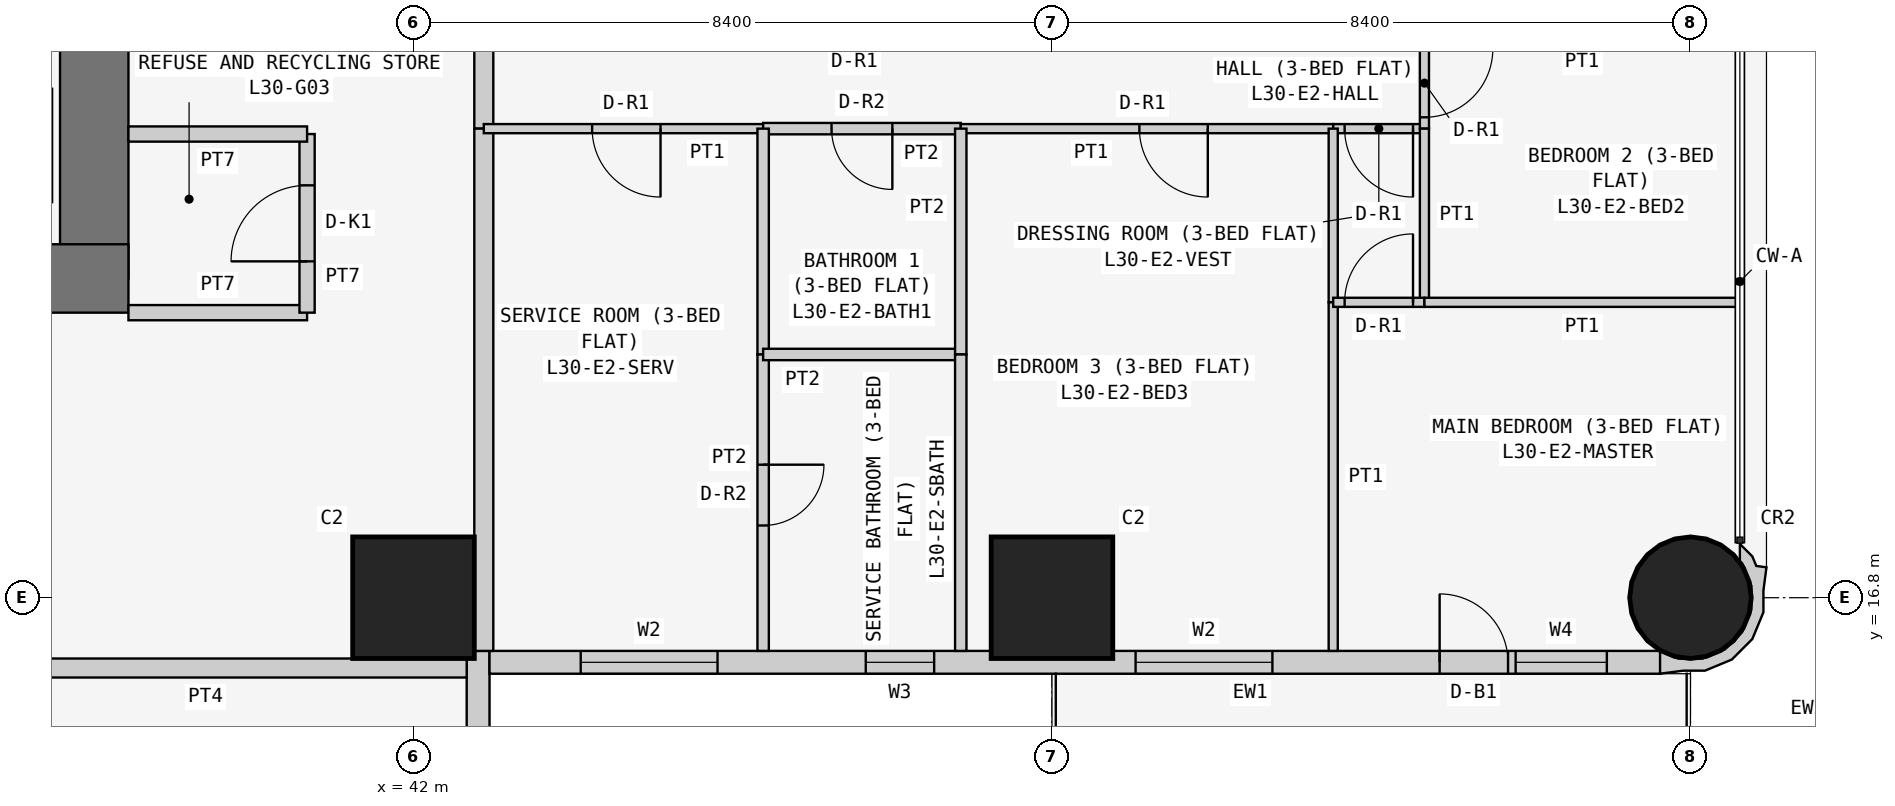
"""IFC4 building model, lengths in metres.
Left out: names, types, materials, properties, quantities, classifications, styles, units other than length and angle.
Written with IfcOpenShell. Run it as: python <this file> out.ifc"""

import sys

from ifc_helpers import new_model, si_unit, direction, frame, frame_2d, origin, origin_2d, place, context, subcontext, project, spatial, polyline, rectangle, circle, outline, extrude, element, fill, save


model = new_model("IFC4")
c1 = context("Model", 3, precision=1e-05, world=origin(), true_north=direction((0.0, 1.0)))
c2 = subcontext(c1, "Body", "Model", "MODEL_VIEW")
j1 = project(units=[si_unit("LENGTHUNIT", "METRE"), si_unit("PLANEANGLEUNIT", "RADIAN")], contexts=[c1])
p1 = place(None, origin())
s1 = spatial("IfcSite", under=j1, at=p1, CompositionType="ELEMENT")
p2 = place(p1, origin())
s2 = spatial("IfcBuilding", under=s1, at=p2, CompositionType="ELEMENT")
p3 = place(p2, frame((0.0, 0.0, 119.7)))
s3 = spatial("IfcBuildingStorey", under=s2, at=p3, CompositionType="ELEMENT", Elevation=119.7)
for number, where, z_axis, x_axis in (
    (1, (42.0, 16.8, 0.0), (0.0, 0.0, 1.0), (1.0, 0.0, 0.0)),
    (2, (50.4, 16.8, 0.0), (0.0, 0.0, 1.0), (1.0, 0.0, 0.0)),
):
    element("IfcColumn", number, at=place(p3, frame(where, z_axis=z_axis, x_axis=x_axis)), inside=s3, PredefinedType="COLUMN", context=c2, shape_type="SweptSolid", body=[
        extrude(rectangle(XDim=1.6, YDim=1.6, at=origin_2d()), origin(), (0.0, 0.0, 1.0), 3.6),
    ])
p4 = place(p3, frame((58.8, 16.8, 0.0), z_axis=(0.0, 0.0, 1.0), x_axis=(1.0, 0.0, 0.0)))
e3 = element("IfcColumn", 3, at=p4, inside=s3, PredefinedType="COLUMN", context=c2, shape_type="SweptSolid", body=[
    extrude(circle(Radius=0.8, at=origin_2d()), origin(), (0.0, 0.0, 1.0), 3.6),
])
p5 = place(p3, frame((21.0, 21.0, 0.0), z_axis=(0.0, 0.0, 1.0), x_axis=(1.0, 0.0, 0.0)))
e4 = element("IfcWall", 4, at=p5, inside=s3, PredefinedType="SHEAR", context=c2, shape_type="SweptSolid", body=[
    extrude(rectangle(XDim=17.25, YDim=0.9, at=frame_2d((8.625, 0.0))), origin(), (0.0, 0.0, 1.0), 3.6),
])
p6 = place(p3, frame((37.8, 21.0, 0.0), z_axis=(0.0, 0.0, 1.0), x_axis=(0.0, 1.0, 0.0)))
e5 = element("IfcWall", 5, at=p6, inside=s3, PredefinedType="SHEAR", context=c2, shape_type="SweptSolid", body=[
    extrude(rectangle(XDim=17.25, YDim=0.9, at=frame_2d((8.625, 0.0))), origin(), (0.0, 0.0, 1.0), 3.6),
])
p7 = place(p6, frame((5.2, 0.0, 0.0)))
e6 = element("IfcOpeningElement", 6, at=p7, cuts=e5, PredefinedType="OPENING", context=c2, shape_type="SweptSolid", body=[
    extrude(rectangle(XDim=1.2, YDim=2.1, at=frame_2d((0.6, 1.05))), frame((0.0, 0.46, 0.0), z_axis=(0.0, -1.0, 0.0), x_axis=(1.0, 0.0, 0.0)), (0.0, 0.0, 1.0), 0.92),
])
p8 = place(p3, frame((42.85, 8.8, 0.0), z_axis=(0.0, 0.0, 1.0), x_axis=(0.0, 1.0, 0.0)))
e7 = element("IfcWall", 7, at=p8, inside=s3, PredefinedType="SOLIDWALL", context=c2, shape_type="SweptSolid", body=[
    extrude(rectangle(XDim=7.3, YDim=0.3, at=frame_2d((3.65, 0.0))), origin(), (0.0, 0.0, 1.0), 3.45),
])
p9 = place(p8, frame((3.1, 0.0, 0.9)))
e8 = element("IfcOpeningElement", 8, at=p9, cuts=e7, PredefinedType="OPENING", context=c2, shape_type="SweptSolid", body=[
    extrude(rectangle(XDim=2.4, YDim=1.5, at=frame_2d((1.2, 0.75))), frame((0.0, 0.16, 0.0), z_axis=(0.0, -1.0, 0.0), x_axis=(1.0, 0.0, 0.0)), (0.0, 0.0, 1.0), 0.32),
])
p10 = place(p8, frame((0.75, 0.0, 0.9)))
e9 = element("IfcOpeningElement", 9, at=p10, cuts=e7, PredefinedType="OPENING", context=c2, shape_type="SweptSolid", body=[
    extrude(rectangle(XDim=1.2, YDim=1.5, at=frame_2d((0.6, 0.75))), frame((0.0, 0.16, 0.0), z_axis=(0.0, -1.0, 0.0), x_axis=(1.0, 0.0, 0.0)), (0.0, 0.0, 1.0), 0.32),
])
p11 = place(p3, frame((43.0, 15.95, 0.0), z_axis=(0.0, 0.0, 1.0), x_axis=(1.0, 0.0, 0.0)))
e10 = element("IfcWall", 10, at=p11, inside=s3, PredefinedType="SOLIDWALL", context=c2, shape_type="SweptSolid", body=[
    extrude(rectangle(XDim=15.4, YDim=0.3, at=frame_2d((7.7, 0.0))), origin(), (0.0, 0.0, 1.0), 3.45),
])
p12 = place(p11, frame((1.2, 0.0, 0.9)))
e11 = element("IfcOpeningElement", 11, at=p12, cuts=e10, PredefinedType="OPENING", context=c2, shape_type="SweptSolid", body=[
    extrude(rectangle(XDim=1.8, YDim=1.5, at=frame_2d((0.9, 0.75))), frame((0.0, 0.16, 0.0), z_axis=(0.0, -1.0, 0.0), x_axis=(1.0, 0.0, 0.0)), (0.0, 0.0, 1.0), 0.32),
])
p13 = place(p11, frame((4.95, 0.0, 1.5)))
e12 = element("IfcOpeningElement", 12, at=p13, cuts=e10, PredefinedType="OPENING", context=c2, shape_type="SweptSolid", body=[
    extrude(rectangle(XDim=0.9, YDim=0.7, at=frame_2d((0.45, 0.35))), frame((0.0, 0.16, 0.0), z_axis=(0.0, -1.0, 0.0), x_axis=(1.0, 0.0, 0.0)), (0.0, 0.0, 1.0), 0.32),
])
p14 = place(p11, frame((8.5, 0.0, 0.9)))
e13 = element("IfcOpeningElement", 13, at=p14, cuts=e10, PredefinedType="OPENING", context=c2, shape_type="SweptSolid", body=[
    extrude(rectangle(XDim=1.8, YDim=1.5, at=frame_2d((0.9, 0.75))), frame((0.0, 0.16, 0.0), z_axis=(0.0, -1.0, 0.0), x_axis=(1.0, 0.0, 0.0)), (0.0, 0.0, 1.0), 0.32),
])
p15 = place(p11, frame((12.5, 0.0, 0.0)))
e14 = element("IfcOpeningElement", 14, at=p15, cuts=e10, PredefinedType="OPENING", context=c2, shape_type="SweptSolid", body=[
    extrude(rectangle(XDim=0.9, YDim=2.4, at=frame_2d((0.45, 1.2))), frame((0.0, 0.16, 0.0), z_axis=(0.0, -1.0, 0.0), x_axis=(1.0, 0.0, 0.0)), (0.0, 0.0, 1.0), 0.32),
])
p16 = place(p11, frame((13.5, 0.0, 0.9)))
e15 = element("IfcOpeningElement", 15, at=p16, cuts=e10, PredefinedType="OPENING", context=c2, shape_type="SweptSolid", body=[
    extrude(rectangle(XDim=1.2, YDim=1.5, at=frame_2d((0.6, 0.75))), frame((0.0, 0.16, 0.0), z_axis=(0.0, -1.0, 0.0), x_axis=(1.0, 0.0, 0.0)), (0.0, 0.0, 1.0), 0.32),
])
p17 = place(p3, frame((58.473, 15.983, 0.0), z_axis=(0.0, 0.0, 1.0), x_axis=(0.93923434088, -0.343276641956, 0.0)))
e16 = element("IfcWall", 16, at=p17, inside=s3, PredefinedType="SOLIDWALL", context=c2, shape_type="SweptSolid", body=[
    extrude(outline(polyline([(0.828, 1.599), (0.697, 1.569), (0.604, 1.67), (0.394, 1.767), (0.471, 1.556), (0.508, 1.539), (0.724, 1.304), (0.834, 1.005), (0.82, 0.686), (0.686, 0.397), (0.451, 0.182), (0.152, 0.073), (-0.116, 0.084), (-0.127, 0.078), (-0.146, 0.071), (-0.006, -0.197), (0.266, -0.055), (0.535, 0.044), (0.817, 0.302), (0.978, 0.648), (0.994, 1.03), (0.895, 1.3), (0.828, 1.599)])), origin(), (0.0, 0.0, 1.0), 3.45),
])
p18 = place(p3, frame((38.25, 20.55, 0.0), z_axis=(0.0, 0.0, 1.0), x_axis=(1.0, 0.0, 0.0)))
e17 = element("IfcWall", 17, at=p18, inside=s3, PredefinedType="PARTITIONING", context=c2, shape_type="SweptSolid", body=[
    extrude(rectangle(XDim=2.35, YDim=0.2, at=frame_2d((1.175, 0.0))), origin(), (0.0, 0.0, 1.0), 3.45),
])
p19 = place(p3, frame((40.6, 20.55, 0.0), z_axis=(0.0, 0.0, 1.0), x_axis=(0.0, 1.0, 0.0)))
e18 = element("IfcWall", 18, at=p19, inside=s3, PredefinedType="PARTITIONING", context=c2, shape_type="SweptSolid", body=[
    extrude(rectangle(XDim=2.35, YDim=0.2, at=frame_2d((1.175, 0.0))), origin(), (0.0, 0.0, 1.0), 3.45),
])
p20 = place(p19, frame((0.675, 0.0, 0.0)))
e19 = element("IfcOpeningElement", 19, at=p20, cuts=e18, PredefinedType="OPENING", context=c2, shape_type="SweptSolid", body=[
    extrude(rectangle(XDim=1.0, YDim=2.1, at=frame_2d((0.5, 1.05))), frame((0.0, 0.11, 0.0), z_axis=(0.0, -1.0, 0.0), x_axis=(1.0, 0.0, 0.0)), (0.0, 0.0, 1.0), 0.22),
])
p21 = place(p3, frame((40.6, 22.9, 0.0), z_axis=(0.0, 0.0, 1.0), x_axis=(-1.0, 0.0, 0.0)))
e20 = element("IfcWall", 20, at=p21, inside=s3, PredefinedType="PARTITIONING", context=c2, shape_type="SweptSolid", body=[
    extrude(rectangle(XDim=2.35, YDim=0.2, at=frame_2d((1.175, 0.0))), origin(), (0.0, 0.0, 1.0), 3.45),
])
p22 = place(p3, frame((42.925, 24.171, 0.0), z_axis=(0.0, 0.0, 1.0), x_axis=(0.0, -1.0, 0.0)))
e21 = element("IfcWall", 21, at=p22, inside=s3, PredefinedType="PARTITIONING", context=c2, shape_type="SweptSolid", body=[
    extrude(rectangle(XDim=1.2, YDim=0.25, at=frame_2d((0.6, 0.0))), origin(), (0.0, 0.0, 1.0), 3.45),
])
for number, where, z_axis, x_axis in (
    (22, (42.925, 22.971, 0.0), (0.0, 0.0, 1.0), (0.0, -1.0, 0.0)),
    (23, (42.7, 15.875, 0.0), (0.0, 0.0, 1.0), (-1.0, 0.0, 0.0)),
):
    element("IfcWall", number, at=place(p3, frame(where, z_axis=z_axis, x_axis=x_axis)), inside=s3, PredefinedType="PARTITIONING", context=c2, shape_type="SweptSolid", body=[
        extrude(rectangle(XDim=6.871, YDim=0.25, at=frame_2d((3.436, 0.0))), origin(), (0.0, 0.0, 1.0), 3.45),
    ])
p23 = place(p3, frame((46.6, 22.971, 0.0), z_axis=(0.0, 0.0, 1.0), x_axis=(-1.0, 0.0, 0.0)))
e24 = element("IfcWall", 24, at=p23, inside=s3, PredefinedType="PARTITIONING", context=c2, shape_type="SweptSolid", body=[
    extrude(rectangle(XDim=3.675, YDim=0.12, at=frame_2d((1.837, 0.0))), origin(), (0.0, 0.0, 1.0), 3.45),
])
p24 = place(p23, frame((1.35, 0.0, 0.0)))
e25 = element("IfcOpeningElement", 25, at=p24, cuts=e24, PredefinedType="OPENING", context=c2, shape_type="SweptSolid", body=[
    extrude(rectangle(XDim=0.9, YDim=2.1, at=frame_2d((0.45, 1.05))), frame((0.0, 0.07, 0.0), z_axis=(0.0, -1.0, 0.0), x_axis=(1.0, 0.0, 0.0)), (0.0, 0.0, 1.0), 0.14),
])
p25 = place(p3, frame((49.2, 22.971, 0.0), z_axis=(0.0, 0.0, 1.0), x_axis=(-1.0, 0.0, 0.0)))
e26 = element("IfcWall", 26, at=p25, inside=s3, PredefinedType="PARTITIONING", context=c2, shape_type="SweptSolid", body=[
    extrude(rectangle(XDim=2.6, YDim=0.15, at=frame_2d((1.3, 0.0))), origin(), (0.0, 0.0, 1.0), 3.45),
])
p26 = place(p25, frame((0.9, 0.0, 0.0)))
e27 = element("IfcOpeningElement", 27, at=p26, cuts=e26, PredefinedType="OPENING", context=c2, shape_type="SweptSolid", body=[
    extrude(rectangle(XDim=0.8, YDim=2.1, at=frame_2d((0.4, 1.05))), frame((0.0, 0.085, 0.0), z_axis=(0.0, -1.0, 0.0), x_axis=(1.0, 0.0, 0.0)), (0.0, 0.0, 1.0), 0.17),
])
p27 = place(p3, frame((54.1, 22.971, 0.0), z_axis=(0.0, 0.0, 1.0), x_axis=(-1.0, 0.0, 0.0)))
e28 = element("IfcWall", 28, at=p27, inside=s3, PredefinedType="PARTITIONING", context=c2, shape_type="SweptSolid", body=[
    extrude(rectangle(XDim=4.9, YDim=0.12, at=frame_2d((2.45, 0.0))), origin(), (0.0, 0.0, 1.0), 3.45),
])
p28 = place(p27, frame((1.65, 0.0, 0.0)))
e29 = element("IfcOpeningElement", 29, at=p28, cuts=e28, PredefinedType="OPENING", context=c2, shape_type="SweptSolid", body=[
    extrude(rectangle(XDim=0.9, YDim=2.1, at=frame_2d((0.45, 1.05))), frame((0.0, 0.07, 0.0), z_axis=(0.0, -1.0, 0.0), x_axis=(1.0, 0.0, 0.0)), (0.0, 0.0, 1.0), 0.14),
])
p29 = place(p3, frame((55.3, 22.971, 0.0), z_axis=(0.0, 0.0, 1.0), x_axis=(-1.0, 0.0, 0.0)))
e30 = element("IfcWall", 30, at=p29, inside=s3, PredefinedType="PARTITIONING", context=c2, shape_type="SweptSolid", body=[
    extrude(rectangle(XDim=1.2, YDim=0.12, at=frame_2d((0.6, 0.0))), origin(), (0.0, 0.0, 1.0), 3.45),
])
p30 = place(p29, frame((0.15, 0.0, 0.0)))
e31 = element("IfcOpeningElement", 31, at=p30, cuts=e30, PredefinedType="OPENING", context=c2, shape_type="SweptSolid", body=[
    extrude(rectangle(XDim=0.9, YDim=2.1, at=frame_2d((0.45, 1.05))), frame((0.0, 0.07, 0.0), z_axis=(0.0, -1.0, 0.0), x_axis=(1.0, 0.0, 0.0)), (0.0, 0.0, 1.0), 0.14),
])
p31 = place(p3, frame((55.3, 24.171, 0.0), z_axis=(0.0, 0.0, 1.0), x_axis=(0.0, -1.0, 0.0)))
e32 = element("IfcWall", 32, at=p31, inside=s3, PredefinedType="PARTITIONING", context=c2, shape_type="SweptSolid", body=[
    extrude(rectangle(XDim=1.2, YDim=0.12, at=frame_2d((0.6, 0.0))), origin(), (0.0, 0.0, 1.0), 3.45),
])
p32 = place(p31, frame((0.151, 0.0, 0.0)))
e33 = element("IfcOpeningElement", 33, at=p32, cuts=e32, PredefinedType="OPENING", context=c2, shape_type="SweptSolid", body=[
    extrude(rectangle(XDim=0.9, YDim=2.1, at=frame_2d((0.45, 1.05))), frame((0.0, 0.07, 0.0), z_axis=(0.0, -1.0, 0.0), x_axis=(1.0, 0.0, 0.0)), (0.0, 0.0, 1.0), 0.14),
])
p33 = place(p3, frame((46.6, 22.971, 0.0), z_axis=(0.0, 0.0, 1.0), x_axis=(0.0, -1.0, 0.0)))
e34 = element("IfcWall", 34, at=p33, inside=s3, PredefinedType="PARTITIONING", context=c2, shape_type="SweptSolid", body=[
    extrude(rectangle(XDim=2.971, YDim=0.15, at=frame_2d((1.485, 0.0))), origin(), (0.0, 0.0, 1.0), 3.45),
])
p34 = place(p3, frame((46.6, 20.0, 0.0), z_axis=(0.0, 0.0, 1.0), x_axis=(0.0, -1.0, 0.0)))
e35 = element("IfcWall", 35, at=p34, inside=s3, PredefinedType="PARTITIONING", context=c2, shape_type="SweptSolid", body=[
    extrude(rectangle(XDim=3.9, YDim=0.15, at=frame_2d((1.95, 0.0))), origin(), (0.0, 0.0, 1.0), 3.45),
])
p35 = place(p34, frame((1.45, 0.0, 0.0)))
e36 = element("IfcOpeningElement", 36, at=p35, cuts=e35, PredefinedType="OPENING", context=c2, shape_type="SweptSolid", body=[
    extrude(rectangle(XDim=0.8, YDim=2.1, at=frame_2d((0.4, 1.05))), frame((0.0, 0.085, 0.0), z_axis=(0.0, -1.0, 0.0), x_axis=(1.0, 0.0, 0.0)), (0.0, 0.0, 1.0), 0.17),
])
p36 = place(p3, frame((49.2, 20.0, 0.0), z_axis=(0.0, 0.0, 1.0), x_axis=(-1.0, 0.0, 0.0)))
e37 = element("IfcWall", 37, at=p36, inside=s3, PredefinedType="PARTITIONING", context=c2, shape_type="SweptSolid", body=[
    extrude(rectangle(XDim=2.6, YDim=0.15, at=frame_2d((1.3, 0.0))), origin(), (0.0, 0.0, 1.0), 3.45),
])
p37 = place(p3, frame((49.2, 22.971, 0.0), z_axis=(0.0, 0.0, 1.0), x_axis=(0.0, -1.0, 0.0)))
e38 = element("IfcWall", 38, at=p37, inside=s3, PredefinedType="PARTITIONING", context=c2, shape_type="SweptSolid", body=[
    extrude(rectangle(XDim=2.971, YDim=0.15, at=frame_2d((1.485, 0.0))), origin(), (0.0, 0.0, 1.0), 3.45),
])
p38 = place(p3, frame((49.2, 20.0, 0.0), z_axis=(0.0, 0.0, 1.0), x_axis=(0.0, -1.0, 0.0)))
e39 = element("IfcWall", 39, at=p38, inside=s3, PredefinedType="PARTITIONING", context=c2, shape_type="SweptSolid", body=[
    extrude(rectangle(XDim=3.9, YDim=0.15, at=frame_2d((1.95, 0.0))), origin(), (0.0, 0.0, 1.0), 3.45),
])
p39 = place(p3, frame((54.1, 22.971, 0.0), z_axis=(0.0, 0.0, 1.0), x_axis=(0.0, -1.0, 0.0)))
e40 = element("IfcWall", 40, at=p39, inside=s3, PredefinedType="PARTITIONING", context=c2, shape_type="SweptSolid", body=[
    extrude(rectangle(XDim=2.285, YDim=0.12, at=frame_2d((1.143, 0.0))), origin(), (0.0, 0.0, 1.0), 3.45),
])
p40 = place(p3, frame((54.1, 20.686, 0.0), z_axis=(0.0, 0.0, 1.0), x_axis=(0.0, -1.0, 0.0)))
e41 = element("IfcWall", 41, at=p40, inside=s3, PredefinedType="PARTITIONING", context=c2, shape_type="SweptSolid", body=[
    extrude(rectangle(XDim=4.586, YDim=0.12, at=frame_2d((2.293, 0.0))), origin(), (0.0, 0.0, 1.0), 3.45),
])
p41 = place(p3, frame((55.3, 22.971, 0.0), z_axis=(0.0, 0.0, 1.0), x_axis=(0.0, -1.0, 0.0)))
e42 = element("IfcWall", 42, at=p41, inside=s3, PredefinedType="PARTITIONING", context=c2, shape_type="SweptSolid", body=[
    extrude(rectangle(XDim=2.285, YDim=0.12, at=frame_2d((1.143, 0.0))), origin(), (0.0, 0.0, 1.0), 3.45),
])
p42 = place(p3, frame((55.3, 20.686, 0.0), z_axis=(0.0, 0.0, 1.0), x_axis=(-1.0, 0.0, 0.0)))
e43 = element("IfcWall", 43, at=p42, inside=s3, PredefinedType="PARTITIONING", context=c2, shape_type="SweptSolid", body=[
    extrude(rectangle(XDim=1.2, YDim=0.12, at=frame_2d((0.6, 0.0))), origin(), (0.0, 0.0, 1.0), 3.45),
])
p43 = place(p42, frame((0.15, 0.0, 0.0)))
e44 = element("IfcOpeningElement", 44, at=p43, cuts=e43, PredefinedType="OPENING", context=c2, shape_type="SweptSolid", body=[
    extrude(rectangle(XDim=0.9, YDim=2.1, at=frame_2d((0.45, 1.05))), frame((0.0, 0.07, 0.0), z_axis=(0.0, -1.0, 0.0), x_axis=(1.0, 0.0, 0.0)), (0.0, 0.0, 1.0), 0.14),
])
p44 = place(p3, frame((59.45, 20.686, 0.0), z_axis=(0.0, 0.0, 1.0), x_axis=(-1.0, 0.0, 0.0)))
e45 = element("IfcWall", 45, at=p44, inside=s3, PredefinedType="PARTITIONING", context=c2, shape_type="SweptSolid", body=[
    extrude(rectangle(XDim=4.15, YDim=0.12, at=frame_2d((2.075, 0.0))), origin(), (0.0, 0.0, 1.0), 3.45),
])
p45 = place(p12, origin())
e46 = element("IfcWindow", 46, at=p45, inside=s3, PartitioningType="SINGLE_PANEL", PredefinedType="WINDOW", context=c2, shape_type="SweptSolid", body=[
    extrude(rectangle(XDim=1.8, YDim=1.5, at=frame_2d((0.9, 0.75))), frame((0.0, 0.03, 0.0), z_axis=(0.0, -1.0, 0.0), x_axis=(1.0, 0.0, 0.0)), (0.0, 0.0, 1.0), 0.06),
])
fill(e11, e46)
p46 = place(p13, origin())
e47 = element("IfcWindow", 47, at=p46, inside=s3, PartitioningType="SINGLE_PANEL", PredefinedType="WINDOW", context=c2, shape_type="SweptSolid", body=[
    extrude(rectangle(XDim=0.9, YDim=0.7, at=frame_2d((0.45, 0.35))), frame((0.0, 0.03, 0.0), z_axis=(0.0, -1.0, 0.0), x_axis=(1.0, 0.0, 0.0)), (0.0, 0.0, 1.0), 0.06),
])
fill(e12, e47)
p47 = place(p14, origin())
e48 = element("IfcWindow", 48, at=p47, inside=s3, PartitioningType="SINGLE_PANEL", PredefinedType="WINDOW", context=c2, shape_type="SweptSolid", body=[
    extrude(rectangle(XDim=1.8, YDim=1.5, at=frame_2d((0.9, 0.75))), frame((0.0, 0.03, 0.0), z_axis=(0.0, -1.0, 0.0), x_axis=(1.0, 0.0, 0.0)), (0.0, 0.0, 1.0), 0.06),
])
fill(e13, e48)
p48 = place(p15, origin())
e49 = element("IfcDoor", 49, at=p48, inside=s3, OperationType="SINGLE_SWING_LEFT", PredefinedType="DOOR", context=c2, shape_type="SweptSolid", body=[
    extrude(rectangle(XDim=0.9, YDim=2.4, at=frame_2d((0.45, 1.2))), frame((0.0, 0.025, 0.0), z_axis=(0.0, -1.0, 0.0), x_axis=(1.0, 0.0, 0.0)), (0.0, 0.0, 1.0), 0.05),
])
fill(e14, e49)
p49 = place(p16, origin())
e50 = element("IfcWindow", 50, at=p49, inside=s3, PartitioningType="SINGLE_PANEL", PredefinedType="WINDOW", context=c2, shape_type="SweptSolid", body=[
    extrude(rectangle(XDim=1.2, YDim=1.5, at=frame_2d((0.6, 0.75))), frame((0.0, 0.03, 0.0), z_axis=(0.0, -1.0, 0.0), x_axis=(1.0, 0.0, 0.0)), (0.0, 0.0, 1.0), 0.06),
])
fill(e15, e50)
p50 = place(p20, origin())
e51 = element("IfcDoor", 51, at=p50, inside=s3, OperationType="SINGLE_SWING_LEFT", PredefinedType="DOOR", context=c2, shape_type="SweptSolid", body=[
    extrude(rectangle(XDim=1.0, YDim=2.1, at=frame_2d((0.5, 1.05))), frame((0.0, 0.025, 0.0), z_axis=(0.0, -1.0, 0.0), x_axis=(1.0, 0.0, 0.0)), (0.0, 0.0, 1.0), 0.05),
])
fill(e19, e51)
p51 = place(p24, origin())
e52 = element("IfcDoor", 52, at=p51, inside=s3, OperationType="SINGLE_SWING_LEFT", PredefinedType="DOOR", context=c2, shape_type="SweptSolid", body=[
    extrude(rectangle(XDim=0.9, YDim=2.1, at=frame_2d((0.45, 1.05))), frame((0.0, 0.025, 0.0), z_axis=(0.0, -1.0, 0.0), x_axis=(1.0, 0.0, 0.0)), (0.0, 0.0, 1.0), 0.05),
])
fill(e25, e52)
p52 = place(p35, origin())
e53 = element("IfcDoor", 53, at=p52, inside=s3, OperationType="SINGLE_SWING_LEFT", PredefinedType="DOOR", context=c2, shape_type="SweptSolid", body=[
    extrude(rectangle(XDim=0.8, YDim=2.1, at=frame_2d((0.4, 1.05))), frame((0.0, 0.025, 0.0), z_axis=(0.0, -1.0, 0.0), x_axis=(1.0, 0.0, 0.0)), (0.0, 0.0, 1.0), 0.05),
])
fill(e36, e53)
p53 = place(p26, origin())
e54 = element("IfcDoor", 54, at=p53, inside=s3, OperationType="SINGLE_SWING_LEFT", PredefinedType="DOOR", context=c2, shape_type="SweptSolid", body=[
    extrude(rectangle(XDim=0.8, YDim=2.1, at=frame_2d((0.4, 1.05))), frame((0.0, 0.025, 0.0), z_axis=(0.0, -1.0, 0.0), x_axis=(1.0, 0.0, 0.0)), (0.0, 0.0, 1.0), 0.05),
])
fill(e27, e54)
p54 = place(p28, origin())
e55 = element("IfcDoor", 55, at=p54, inside=s3, OperationType="SINGLE_SWING_LEFT", PredefinedType="DOOR", context=c2, shape_type="SweptSolid", body=[
    extrude(rectangle(XDim=0.9, YDim=2.1, at=frame_2d((0.45, 1.05))), frame((0.0, 0.025, 0.0), z_axis=(0.0, -1.0, 0.0), x_axis=(1.0, 0.0, 0.0)), (0.0, 0.0, 1.0), 0.05),
])
fill(e29, e55)
p55 = place(p30, origin())
e56 = element("IfcDoor", 56, at=p55, inside=s3, OperationType="SINGLE_SWING_LEFT", PredefinedType="DOOR", context=c2, shape_type="SweptSolid", body=[
    extrude(rectangle(XDim=0.9, YDim=2.1, at=frame_2d((0.45, 1.05))), frame((0.0, 0.025, 0.0), z_axis=(0.0, -1.0, 0.0), x_axis=(1.0, 0.0, 0.0)), (0.0, 0.0, 1.0), 0.05),
])
fill(e31, e56)
p56 = place(p43, frame((0.9, 0.0, 0.0), z_axis=(0.0, 0.0, 1.0), x_axis=(-1.0, 0.0, 0.0)))
e57 = element("IfcDoor", 57, at=p56, inside=s3, OperationType="SINGLE_SWING_RIGHT", PredefinedType="DOOR", context=c2, shape_type="SweptSolid", body=[
    extrude(rectangle(XDim=0.9, YDim=2.1, at=frame_2d((0.45, 1.05))), frame((0.0, 0.025, 0.0), z_axis=(0.0, -1.0, 0.0), x_axis=(1.0, 0.0, 0.0)), (0.0, 0.0, 1.0), 0.05),
])
fill(e44, e57)
p57 = place(p32, origin())
e58 = element("IfcDoor", 58, at=p57, inside=s3, OperationType="SINGLE_SWING_LEFT", PredefinedType="DOOR", context=c2, shape_type="SweptSolid", body=[
    extrude(rectangle(XDim=0.9, YDim=2.1, at=frame_2d((0.45, 1.05))), frame((0.0, 0.025, 0.0), z_axis=(0.0, -1.0, 0.0), x_axis=(1.0, 0.0, 0.0)), (0.0, 0.0, 1.0), 0.05),
])
fill(e33, e58)
save(model, sys.argv[1])
